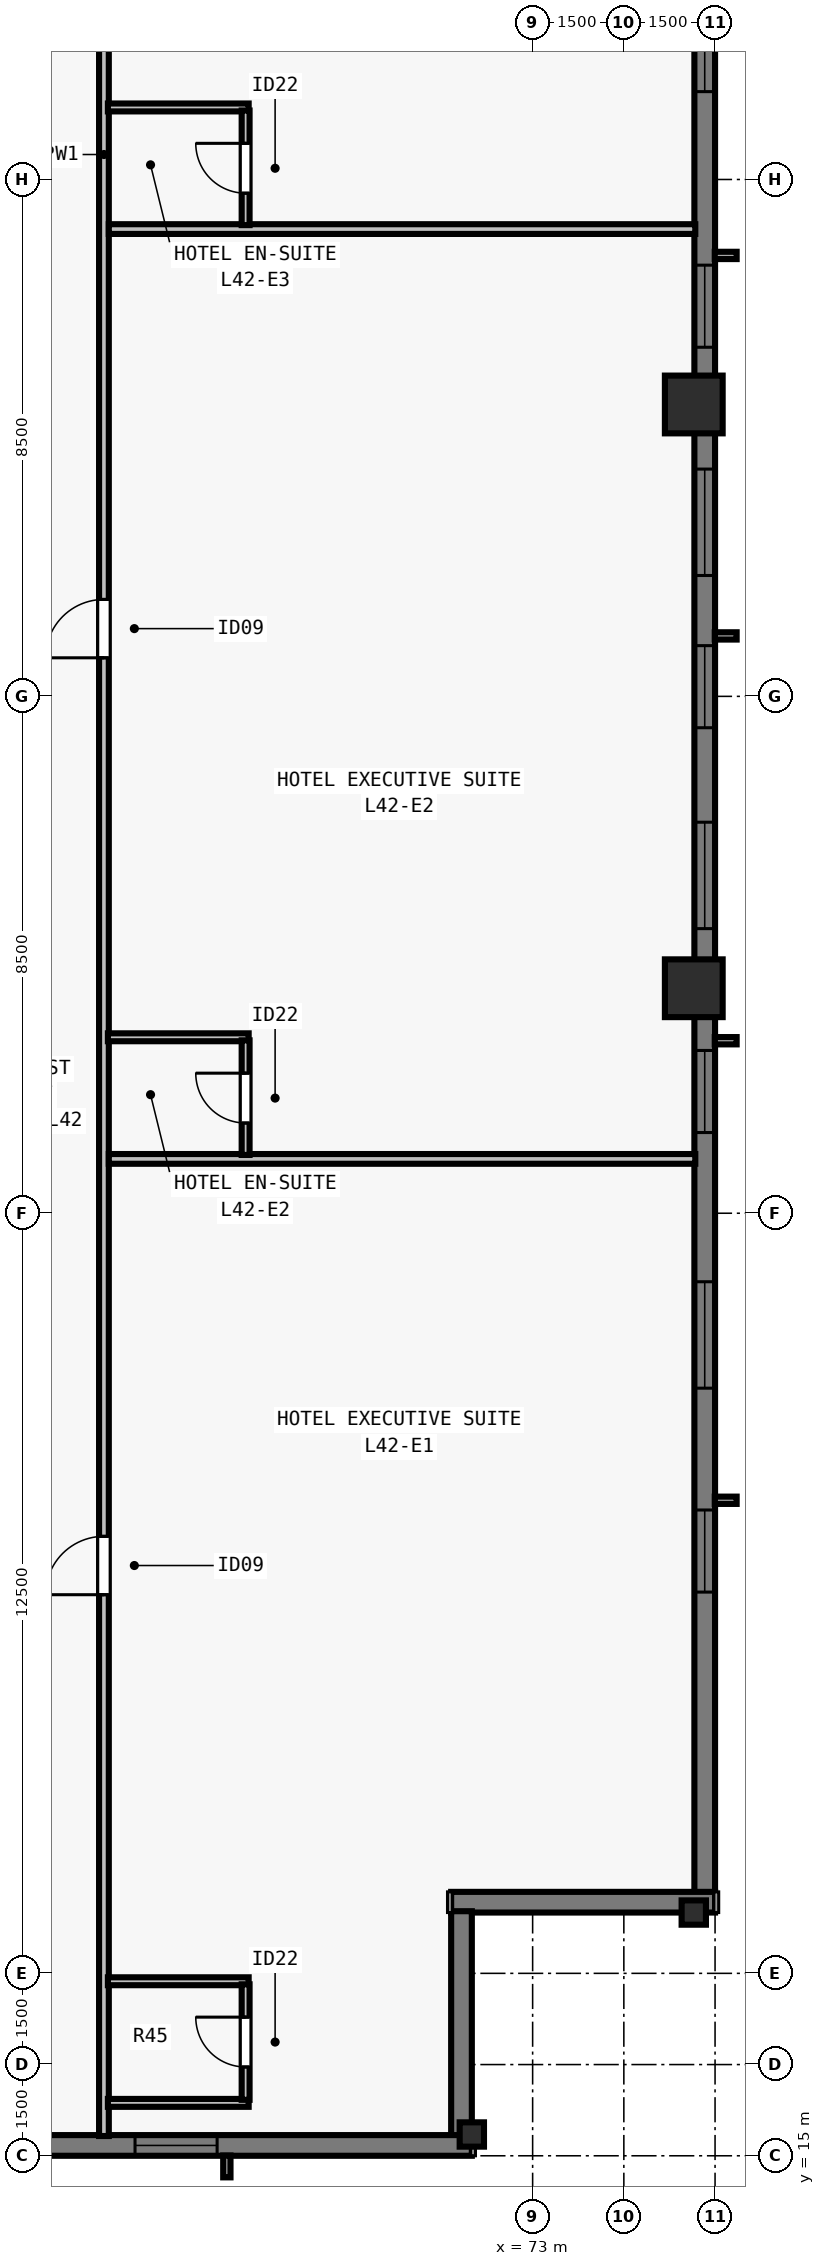
"""IFC4 building model, lengths in metres.
Left out: names, types, materials, properties, quantities, classifications, styles, units other than length and angle.
Written with IfcOpenShell. Run it as: python <this file> out.ifc"""

import sys

from ifc_helpers import new_model, si_unit, direction, frame, frame_2d, origin, origin_2d, place, context, subcontext, project, spatial, rectangle, i_section, extrude, element, fill, save


model = new_model("IFC4")
c1 = context("Model", 3, precision=1e-05, world=origin(), true_north=direction((0.0, 1.0)))
c2 = subcontext(c1, "Body", "Model", "MODEL_VIEW")
j1 = project(units=[si_unit("LENGTHUNIT", "METRE"), si_unit("PLANEANGLEUNIT", "RADIAN")], contexts=[c1])
p1 = place(None, origin())
s1 = spatial("IfcSite", under=j1, at=p1, CompositionType="ELEMENT")
p2 = place(p1, origin())
s2 = spatial("IfcBuilding", under=s1, at=p2, CompositionType="ELEMENT")
p3 = place(p2, frame((0.0, 0.0, 155.0)))
s3 = spatial("IfcBuildingStorey", under=s2, at=p3, CompositionType="ELEMENT", Elevation=155.0)
for number, where, z_axis, x_axis in (
    (1, (72.0, 15.35, 0.0), (0.0, 0.0, 1.0), (1.0, 0.0, 0.0)),
    (2, (75.65, 19.0, 0.0), (0.0, 0.0, 1.0), (0.0, 1.0, 0.0)),
):
    element("IfcColumn", number, at=place(p3, frame(where, z_axis=z_axis, x_axis=x_axis)), inside=s3, PredefinedType="COLUMN", context=c2, shape_type="SweptSolid", body=[
        extrude(i_section(OverallWidth=0.4, OverallDepth=0.4, WebThickness=0.022, FlangeThickness=0.036, at=origin_2d()), origin(), (0.0, 0.0, 1.0), 3.5),
    ])
for number, where, z_axis, x_axis in (
    (3, (75.65, 34.2, 0.0), (0.0, 0.0, 1.0), (0.0, 1.0, 0.0)),
    (4, (75.65, 43.8, 0.0), (0.0, 0.0, 1.0), (0.0, 1.0, 0.0)),
):
    element("IfcColumn", number, at=place(p3, frame(where, z_axis=z_axis, x_axis=x_axis)), inside=s3, PredefinedType="COLUMN", context=c2, shape_type="SweptSolid", body=[
        extrude(rectangle(XDim=0.95, YDim=0.95, at=origin_2d()), origin(), (0.0, 0.0, 1.0), 3.5),
    ])
p4 = place(p3, frame((75.83, 59.0, 0.0), z_axis=(0.0, 0.0, 1.0), x_axis=(0.0, -1.0, 0.0)))
e5 = element("IfcWall", 5, at=p4, inside=s3, PredefinedType="SOLIDWALL", context=c2, shape_type="SweptSolid", body=[
    extrude(rectangle(XDim=39.682, YDim=0.34, at=frame_2d((19.841, 0.0))), origin(), (0.0, 0.0, 1.0), 3.28),
])
p5 = place(p4, frame((4.952, 0.0, 0.8)))
e6 = element("IfcOpeningElement", 6, at=p5, cuts=e5, PredefinedType="OPENING", context=c2, shape_type="SweptSolid", body=[
    extrude(rectangle(XDim=1.35, YDim=1.66, at=frame_2d((0.675, 0.83))), frame((0.0, 0.18, 0.0), z_axis=(0.0, -1.0, 0.0), x_axis=(1.0, 0.0, 0.0)), (0.0, 0.0, 1.0), 0.36),
])
p6 = place(p4, frame((8.305, 0.0, 0.8)))
e7 = element("IfcOpeningElement", 7, at=p6, cuts=e5, PredefinedType="OPENING", context=c2, shape_type="SweptSolid", body=[
    extrude(rectangle(XDim=1.75, YDim=1.66, at=frame_2d((0.875, 0.83))), frame((0.0, 0.18, 0.0), z_axis=(0.0, -1.0, 0.0), x_axis=(1.0, 0.0, 0.0)), (0.0, 0.0, 1.0), 0.36),
])
p7 = place(p4, frame((12.909, 0.0, 0.8)))
e8 = element("IfcOpeningElement", 8, at=p7, cuts=e5, PredefinedType="OPENING", context=c2, shape_type="SweptSolid", body=[
    extrude(rectangle(XDim=1.35, YDim=1.66, at=frame_2d((0.675, 0.83))), frame((0.0, 0.18, 0.0), z_axis=(0.0, -1.0, 0.0), x_axis=(1.0, 0.0, 0.0)), (0.0, 0.0, 1.0), 0.36),
])
p8 = place(p4, frame((16.262, 0.0, 0.8)))
e9 = element("IfcOpeningElement", 9, at=p8, cuts=e5, PredefinedType="OPENING", context=c2, shape_type="SweptSolid", body=[
    extrude(rectangle(XDim=1.75, YDim=1.66, at=frame_2d((0.875, 0.83))), frame((0.0, 0.18, 0.0), z_axis=(0.0, -1.0, 0.0), x_axis=(1.0, 0.0, 0.0)), (0.0, 0.0, 1.0), 0.36),
])
p9 = place(p4, frame((19.166, 0.0, 0.8)))
e10 = element("IfcOpeningElement", 10, at=p9, cuts=e5, PredefinedType="OPENING", context=c2, shape_type="SweptSolid", body=[
    extrude(rectangle(XDim=1.35, YDim=1.66, at=frame_2d((0.675, 0.83))), frame((0.0, 0.18, 0.0), z_axis=(0.0, -1.0, 0.0), x_axis=(1.0, 0.0, 0.0)), (0.0, 0.0, 1.0), 0.36),
])
p10 = place(p4, frame((22.07, 0.0, 0.8)))
e11 = element("IfcOpeningElement", 11, at=p10, cuts=e5, PredefinedType="OPENING", context=c2, shape_type="SweptSolid", body=[
    extrude(rectangle(XDim=1.75, YDim=1.66, at=frame_2d((0.875, 0.83))), frame((0.0, 0.18, 0.0), z_axis=(0.0, -1.0, 0.0), x_axis=(1.0, 0.0, 0.0)), (0.0, 0.0, 1.0), 0.36),
])
p11 = place(p4, frame((25.823, 0.0, 0.8)))
e12 = element("IfcOpeningElement", 12, at=p11, cuts=e5, PredefinedType="OPENING", context=c2, shape_type="SweptSolid", body=[
    extrude(rectangle(XDim=1.35, YDim=1.66, at=frame_2d((0.675, 0.83))), frame((0.0, 0.18, 0.0), z_axis=(0.0, -1.0, 0.0), x_axis=(1.0, 0.0, 0.0)), (0.0, 0.0, 1.0), 0.36),
])
p12 = place(p4, frame((29.627, 0.0, 0.8)))
e13 = element("IfcOpeningElement", 13, at=p12, cuts=e5, PredefinedType="OPENING", context=c2, shape_type="SweptSolid", body=[
    extrude(rectangle(XDim=1.75, YDim=1.66, at=frame_2d((0.875, 0.83))), frame((0.0, 0.18, 0.0), z_axis=(0.0, -1.0, 0.0), x_axis=(1.0, 0.0, 0.0)), (0.0, 0.0, 1.0), 0.36),
])
p13 = place(p4, frame((33.38, 0.0, 0.8)))
e14 = element("IfcOpeningElement", 14, at=p13, cuts=e5, PredefinedType="OPENING", context=c2, shape_type="SweptSolid", body=[
    extrude(rectangle(XDim=1.35, YDim=1.66, at=frame_2d((0.675, 0.83))), frame((0.0, 0.18, 0.0), z_axis=(0.0, -1.0, 0.0), x_axis=(1.0, 0.0, 0.0)), (0.0, 0.0, 1.0), 0.36),
])
p14 = place(p3, frame((76.0, 19.17, 0.0), z_axis=(0.0, 0.0, 1.0), x_axis=(-1.0, 0.0, 0.0)))
e15 = element("IfcWall", 15, at=p14, inside=s3, PredefinedType="SOLIDWALL", context=c2, shape_type="SweptSolid", body=[
    extrude(rectangle(XDim=4.34, YDim=0.34, at=frame_2d((2.17, 0.0))), origin(), (0.0, 0.0, 1.0), 3.28),
])
p15 = place(p3, frame((71.83, 19.022, 0.0), z_axis=(0.0, 0.0, 1.0), x_axis=(0.0, -1.0, 0.0)))
e16 = element("IfcWall", 16, at=p15, inside=s3, PredefinedType="SOLIDWALL", context=c2, shape_type="SweptSolid", body=[
    extrude(rectangle(XDim=3.704, YDim=0.34, at=frame_2d((1.852, 0.0))), origin(), (0.0, 0.0, 1.0), 3.28),
])
p16 = place(p3, frame((72.0, 15.17, 0.0), z_axis=(0.0, 0.0, 1.0), x_axis=(-1.0, 0.0, 0.0)))
e17 = element("IfcWall", 17, at=p16, inside=s3, PredefinedType="SOLIDWALL", context=c2, shape_type="SweptSolid", body=[
    extrude(rectangle(XDim=16.282, YDim=0.34, at=frame_2d((8.141, 0.0))), origin(), (0.0, 0.0, 1.0), 3.28),
])
p17 = place(p16, frame((4.189, 0.0, 0.8)))
e18 = element("IfcOpeningElement", 18, at=p17, cuts=e17, PredefinedType="OPENING", context=c2, shape_type="SweptSolid", body=[
    extrude(rectangle(XDim=1.35, YDim=1.66, at=frame_2d((0.675, 0.83))), frame((0.0, 0.18, 0.0), z_axis=(0.0, -1.0, 0.0), x_axis=(1.0, 0.0, 0.0)), (0.0, 0.0, 1.0), 0.36),
])
p18 = place(p16, frame((8.566, 0.0, 0.8)))
e19 = element("IfcOpeningElement", 19, at=p18, cuts=e17, PredefinedType="OPENING", context=c2, shape_type="SweptSolid", body=[
    extrude(rectangle(XDim=1.75, YDim=1.66, at=frame_2d((0.875, 0.83))), frame((0.0, 0.18, 0.0), z_axis=(0.0, -1.0, 0.0), x_axis=(1.0, 0.0, 0.0)), (0.0, 0.0, 1.0), 0.36),
])
p19 = place(p16, frame((12.493, 0.0, 0.8)))
e20 = element("IfcOpeningElement", 20, at=p19, cuts=e17, PredefinedType="OPENING", context=c2, shape_type="SweptSolid", body=[
    extrude(rectangle(XDim=1.35, YDim=1.66, at=frame_2d((0.675, 0.83))), frame((0.0, 0.18, 0.0), z_axis=(0.0, -1.0, 0.0), x_axis=(1.0, 0.0, 0.0)), (0.0, 0.0, 1.0), 0.36),
])
p20 = place(p3, frame((65.95, 15.325, 0.0), z_axis=(0.0, 0.0, 1.0), x_axis=(0.0, 1.0, 0.0)))
e21 = element("IfcWall", 21, at=p20, inside=s3, PredefinedType="PARTITIONING", context=c2, shape_type="SweptSolid", body=[
    extrude(rectangle(XDim=47.35, YDim=0.16, at=frame_2d((23.675, 0.0))), origin(), (0.0, 0.0, 1.0), 2.555),
])
p21 = place(p20, frame((8.902, 0.0, 0.0)))
e22 = element("IfcOpeningElement", 22, at=p21, cuts=e21, PredefinedType="OPENING", context=c2, shape_type="SweptSolid", body=[
    extrude(rectangle(XDim=0.96, YDim=2.15, at=frame_2d((0.48, 1.075))), frame((0.0, 0.09, 0.0), z_axis=(0.0, -1.0, 0.0), x_axis=(1.0, 0.0, 0.0)), (0.0, 0.0, 1.0), 0.18),
])
p22 = place(p20, frame((24.309, 0.0, 0.0)))
e23 = element("IfcOpeningElement", 23, at=p22, cuts=e21, PredefinedType="OPENING", context=c2, shape_type="SweptSolid", body=[
    extrude(rectangle(XDim=0.96, YDim=2.15, at=frame_2d((0.48, 1.075))), frame((0.0, 0.09, 0.0), z_axis=(0.0, -1.0, 0.0), x_axis=(1.0, 0.0, 0.0)), (0.0, 0.0, 1.0), 0.18),
])
p23 = place(p20, frame((39.902, 0.0, 0.0)))
e24 = element("IfcOpeningElement", 24, at=p23, cuts=e21, PredefinedType="OPENING", context=c2, shape_type="SweptSolid", body=[
    extrude(rectangle(XDim=0.96, YDim=2.15, at=frame_2d((0.48, 1.075))), frame((0.0, 0.09, 0.0), z_axis=(0.0, -1.0, 0.0), x_axis=(1.0, 0.0, 0.0)), (0.0, 0.0, 1.0), 0.18),
])
for number, where, z_axis, x_axis in (
    (25, (66.015, 15.87, 0.0), (0.0, 0.0, 1.0), (1.0, 0.0, 0.0)),
    (26, (66.015, 17.87, 0.0), (0.0, 0.0, 1.0), (1.0, 0.0, 0.0)),
):
    element("IfcWall", number, at=place(p3, frame(where, z_axis=z_axis, x_axis=x_axis)), inside=s3, PredefinedType="PLUMBINGWALL", context=c2, shape_type="SweptSolid", body=[
        extrude(rectangle(XDim=2.315, YDim=0.13, at=frame_2d((1.158, 0.0))), origin(), (0.0, 0.0, 1.0), 3.28),
    ])
p24 = place(p3, frame((68.28, 15.92, 0.0), z_axis=(0.0, 0.0, 1.0), x_axis=(0.0, 1.0, 0.0)))
e27 = element("IfcWall", 27, at=p24, inside=s3, PredefinedType="PLUMBINGWALL", context=c2, shape_type="SweptSolid", body=[
    extrude(rectangle(XDim=1.9, YDim=0.13, at=frame_2d((0.95, 0.0))), origin(), (0.0, 0.0, 1.0), 3.28),
])
p25 = place(p24, frame((0.54, 0.0, 0.0)))
e28 = element("IfcOpeningElement", 28, at=p25, cuts=e27, PredefinedType="OPENING", context=c2, shape_type="SweptSolid", body=[
    extrude(rectangle(XDim=0.82, YDim=2.1, at=frame_2d((0.41, 1.05))), frame((0.0, 0.075, 0.0), z_axis=(0.0, -1.0, 0.0), x_axis=(1.0, 0.0, 0.0)), (0.0, 0.0, 1.0), 0.15),
])
p26 = place(p3, frame((66.03, 31.394, 0.0), z_axis=(0.0, 0.0, 1.0), x_axis=(1.0, 0.0, 0.0)))
e29 = element("IfcWall", 29, at=p26, inside=s3, PredefinedType="PARTITIONING", context=c2, shape_type="SweptSolid", body=[
    extrude(rectangle(XDim=9.645, YDim=0.16, at=frame_2d((4.823, 0.0))), origin(), (0.0, 0.0, 1.0), 3.28),
])
p27 = place(p3, frame((66.015, 33.394, 0.0), z_axis=(0.0, 0.0, 1.0), x_axis=(1.0, 0.0, 0.0)))
e30 = element("IfcWall", 30, at=p27, inside=s3, PredefinedType="PLUMBINGWALL", context=c2, shape_type="SweptSolid", body=[
    extrude(rectangle(XDim=2.315, YDim=0.13, at=frame_2d((1.158, 0.0))), origin(), (0.0, 0.0, 1.0), 3.28),
])
p28 = place(p3, frame((68.28, 31.458, 0.0), z_axis=(0.0, 0.0, 1.0), x_axis=(0.0, 1.0, 0.0)))
e31 = element("IfcWall", 31, at=p28, inside=s3, PredefinedType="PLUMBINGWALL", context=c2, shape_type="SweptSolid", body=[
    extrude(rectangle(XDim=1.885, YDim=0.13, at=frame_2d((0.942, 0.0))), origin(), (0.0, 0.0, 1.0), 3.28),
])
p29 = place(p28, frame((0.525, 0.0, 0.0)))
e32 = element("IfcOpeningElement", 32, at=p29, cuts=e31, PredefinedType="OPENING", context=c2, shape_type="SweptSolid", body=[
    extrude(rectangle(XDim=0.82, YDim=2.1, at=frame_2d((0.41, 1.05))), frame((0.0, 0.075, 0.0), z_axis=(0.0, -1.0, 0.0), x_axis=(1.0, 0.0, 0.0)), (0.0, 0.0, 1.0), 0.15),
])
p30 = place(p3, frame((66.03, 46.685, 0.0), z_axis=(0.0, 0.0, 1.0), x_axis=(1.0, 0.0, 0.0)))
e33 = element("IfcWall", 33, at=p30, inside=s3, PredefinedType="PARTITIONING", context=c2, shape_type="SweptSolid", body=[
    extrude(rectangle(XDim=9.645, YDim=0.16, at=frame_2d((4.823, 0.0))), origin(), (0.0, 0.0, 1.0), 3.28),
])
p31 = place(p3, frame((66.015, 48.685, 0.0), z_axis=(0.0, 0.0, 1.0), x_axis=(1.0, 0.0, 0.0)))
e34 = element("IfcWall", 34, at=p31, inside=s3, PredefinedType="PLUMBINGWALL", context=c2, shape_type="SweptSolid", body=[
    extrude(rectangle(XDim=2.315, YDim=0.13, at=frame_2d((1.158, 0.0))), origin(), (0.0, 0.0, 1.0), 3.28),
])
p32 = place(p3, frame((68.28, 46.75, 0.0), z_axis=(0.0, 0.0, 1.0), x_axis=(0.0, 1.0, 0.0)))
e35 = element("IfcWall", 35, at=p32, inside=s3, PredefinedType="PLUMBINGWALL", context=c2, shape_type="SweptSolid", body=[
    extrude(rectangle(XDim=1.885, YDim=0.13, at=frame_2d((0.942, 0.0))), origin(), (0.0, 0.0, 1.0), 3.28),
])
p33 = place(p32, frame((0.525, 0.0, 0.0)))
e36 = element("IfcOpeningElement", 36, at=p33, cuts=e35, PredefinedType="OPENING", context=c2, shape_type="SweptSolid", body=[
    extrude(rectangle(XDim=0.82, YDim=2.1, at=frame_2d((0.41, 1.05))), frame((0.0, 0.075, 0.0), z_axis=(0.0, -1.0, 0.0), x_axis=(1.0, 0.0, 0.0)), (0.0, 0.0, 1.0), 0.15),
])
p34 = place(p6, origin())
e37 = element("IfcWindow", 37, at=p34, inside=s3, PartitioningType="SINGLE_PANEL", PredefinedType="WINDOW", context=c2, shape_type="SweptSolid", body=[
    extrude(rectangle(XDim=1.75, YDim=1.66, at=frame_2d((0.875, 0.83))), frame((0.0, -0.05, 0.0), z_axis=(0.0, -1.0, 0.0), x_axis=(1.0, 0.0, 0.0)), (0.0, 0.0, 1.0), 0.06),
])
fill(e7, e37)
p35 = place(p7, origin())
e38 = element("IfcWindow", 38, at=p35, inside=s3, PartitioningType="SINGLE_PANEL", PredefinedType="WINDOW", context=c2, shape_type="SweptSolid", body=[
    extrude(rectangle(XDim=1.35, YDim=1.66, at=frame_2d((0.675, 0.83))), frame((0.0, -0.05, 0.0), z_axis=(0.0, -1.0, 0.0), x_axis=(1.0, 0.0, 0.0)), (0.0, 0.0, 1.0), 0.06),
])
fill(e8, e38)
p36 = place(p8, origin())
e39 = element("IfcWindow", 39, at=p36, inside=s3, PartitioningType="SINGLE_PANEL", PredefinedType="WINDOW", context=c2, shape_type="SweptSolid", body=[
    extrude(rectangle(XDim=1.75, YDim=1.66, at=frame_2d((0.875, 0.83))), frame((0.0, -0.05, 0.0), z_axis=(0.0, -1.0, 0.0), x_axis=(1.0, 0.0, 0.0)), (0.0, 0.0, 1.0), 0.06),
])
fill(e9, e39)
p37 = place(p9, origin())
e40 = element("IfcWindow", 40, at=p37, inside=s3, PartitioningType="SINGLE_PANEL", PredefinedType="WINDOW", context=c2, shape_type="SweptSolid", body=[
    extrude(rectangle(XDim=1.35, YDim=1.66, at=frame_2d((0.675, 0.83))), frame((0.0, -0.05, 0.0), z_axis=(0.0, -1.0, 0.0), x_axis=(1.0, 0.0, 0.0)), (0.0, 0.0, 1.0), 0.06),
])
fill(e10, e40)
p38 = place(p10, origin())
e41 = element("IfcWindow", 41, at=p38, inside=s3, PartitioningType="SINGLE_PANEL", PredefinedType="WINDOW", context=c2, shape_type="SweptSolid", body=[
    extrude(rectangle(XDim=1.75, YDim=1.66, at=frame_2d((0.875, 0.83))), frame((0.0, -0.05, 0.0), z_axis=(0.0, -1.0, 0.0), x_axis=(1.0, 0.0, 0.0)), (0.0, 0.0, 1.0), 0.06),
])
fill(e11, e41)
p39 = place(p11, origin())
e42 = element("IfcWindow", 42, at=p39, inside=s3, PartitioningType="SINGLE_PANEL", PredefinedType="WINDOW", context=c2, shape_type="SweptSolid", body=[
    extrude(rectangle(XDim=1.35, YDim=1.66, at=frame_2d((0.675, 0.83))), frame((0.0, -0.05, 0.0), z_axis=(0.0, -1.0, 0.0), x_axis=(1.0, 0.0, 0.0)), (0.0, 0.0, 1.0), 0.06),
])
fill(e12, e42)
p40 = place(p12, origin())
e43 = element("IfcWindow", 43, at=p40, inside=s3, PartitioningType="SINGLE_PANEL", PredefinedType="WINDOW", context=c2, shape_type="SweptSolid", body=[
    extrude(rectangle(XDim=1.75, YDim=1.66, at=frame_2d((0.875, 0.83))), frame((0.0, -0.05, 0.0), z_axis=(0.0, -1.0, 0.0), x_axis=(1.0, 0.0, 0.0)), (0.0, 0.0, 1.0), 0.06),
])
fill(e13, e43)
p41 = place(p13, origin())
e44 = element("IfcWindow", 44, at=p41, inside=s3, PartitioningType="SINGLE_PANEL", PredefinedType="WINDOW", context=c2, shape_type="SweptSolid", body=[
    extrude(rectangle(XDim=1.35, YDim=1.66, at=frame_2d((0.675, 0.83))), frame((0.0, -0.05, 0.0), z_axis=(0.0, -1.0, 0.0), x_axis=(1.0, 0.0, 0.0)), (0.0, 0.0, 1.0), 0.06),
])
fill(e14, e44)
p42 = place(p17, origin())
e45 = element("IfcWindow", 45, at=p42, inside=s3, PartitioningType="SINGLE_PANEL", PredefinedType="WINDOW", context=c2, shape_type="SweptSolid", body=[
    extrude(rectangle(XDim=1.35, YDim=1.66, at=frame_2d((0.675, 0.83))), frame((0.0, -0.05, 0.0), z_axis=(0.0, -1.0, 0.0), x_axis=(1.0, 0.0, 0.0)), (0.0, 0.0, 1.0), 0.06),
])
fill(e18, e45)
p43 = place(p25, origin())
e46 = element("IfcDoor", 46, at=p43, inside=s3, OperationType="SINGLE_SWING_RIGHT", PredefinedType="DOOR", context=c2, shape_type="SweptSolid", body=[
    extrude(rectangle(XDim=0.82, YDim=2.1, at=frame_2d((0.41, 1.05))), frame((0.0, 0.025, 0.0), z_axis=(0.0, -1.0, 0.0), x_axis=(1.0, 0.0, 0.0)), (0.0, 0.0, 1.0), 0.05),
])
fill(e28, e46)
p44 = place(p21, origin())
e47 = element("IfcDoor", 47, at=p44, inside=s3, OperationType="SINGLE_SWING_LEFT", PredefinedType="DOOR", context=c2, shape_type="SweptSolid", body=[
    extrude(rectangle(XDim=0.96, YDim=2.15, at=frame_2d((0.48, 1.075))), frame((0.0, 0.025, 0.0), z_axis=(0.0, -1.0, 0.0), x_axis=(1.0, 0.0, 0.0)), (0.0, 0.0, 1.0), 0.05),
])
fill(e22, e47)
p45 = place(p29, origin())
e48 = element("IfcDoor", 48, at=p45, inside=s3, OperationType="SINGLE_SWING_RIGHT", PredefinedType="DOOR", context=c2, shape_type="SweptSolid", body=[
    extrude(rectangle(XDim=0.82, YDim=2.1, at=frame_2d((0.41, 1.05))), frame((0.0, 0.025, 0.0), z_axis=(0.0, -1.0, 0.0), x_axis=(1.0, 0.0, 0.0)), (0.0, 0.0, 1.0), 0.05),
])
fill(e32, e48)
p46 = place(p22, origin())
e49 = element("IfcDoor", 49, at=p46, inside=s3, OperationType="SINGLE_SWING_LEFT", PredefinedType="DOOR", context=c2, shape_type="SweptSolid", body=[
    extrude(rectangle(XDim=0.96, YDim=2.15, at=frame_2d((0.48, 1.075))), frame((0.0, 0.025, 0.0), z_axis=(0.0, -1.0, 0.0), x_axis=(1.0, 0.0, 0.0)), (0.0, 0.0, 1.0), 0.05),
])
fill(e23, e49)
p47 = place(p33, origin())
e50 = element("IfcDoor", 50, at=p47, inside=s3, OperationType="SINGLE_SWING_RIGHT", PredefinedType="DOOR", context=c2, shape_type="SweptSolid", body=[
    extrude(rectangle(XDim=0.82, YDim=2.1, at=frame_2d((0.41, 1.05))), frame((0.0, 0.025, 0.0), z_axis=(0.0, -1.0, 0.0), x_axis=(1.0, 0.0, 0.0)), (0.0, 0.0, 1.0), 0.05),
])
fill(e36, e50)
save(model, sys.argv[1])
